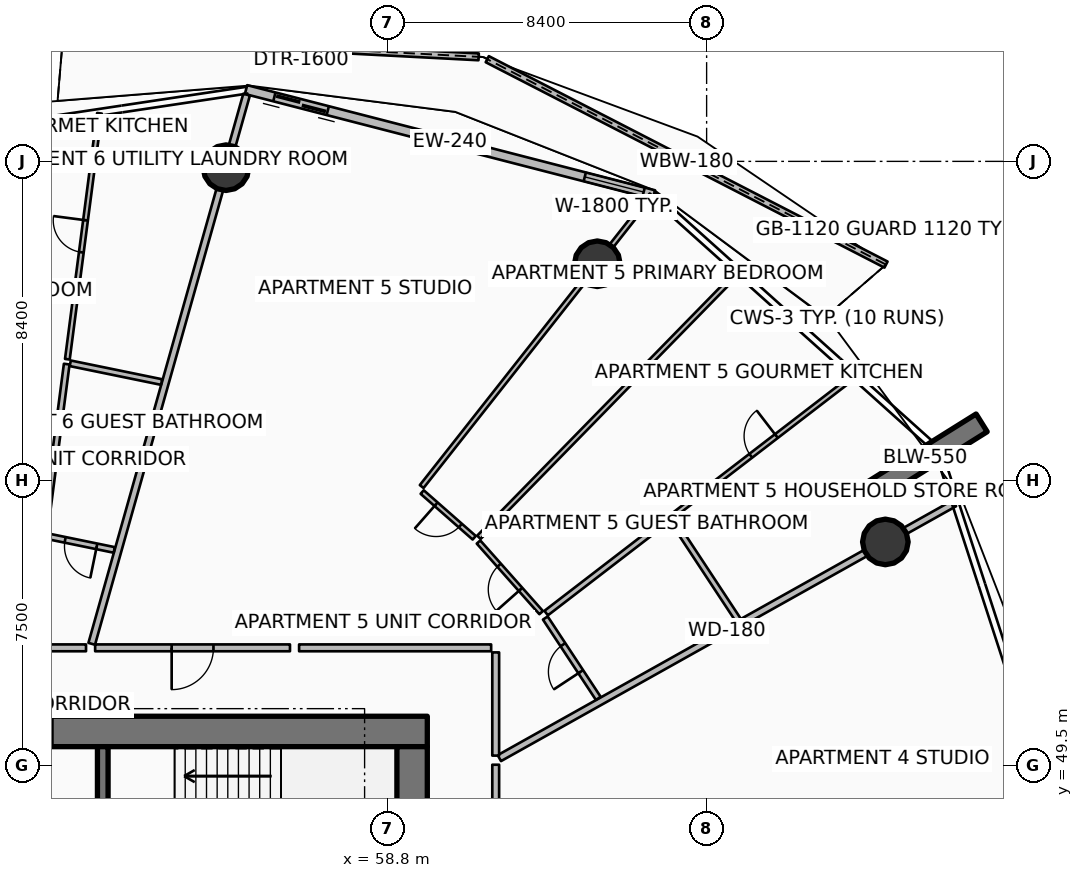
"""IFC4 building model, lengths in metres.
Left out: names, types, materials, properties, quantities, classifications, styles, units other than length and angle.
Written with IfcOpenShell. Run it as: python <this file> out.ifc"""

import sys

from ifc_helpers import new_model, si_unit, direction, frame, frame_2d, origin, origin_2d, place, context, subcontext, project, spatial, polyline, rectangle, circle, outline, extrude, element, fill, save


model = new_model("IFC4")
c1 = context("Model", 3, precision=1e-05, world=origin(), true_north=direction((0.0, 1.0)))
c2 = subcontext(c1, "Body", "Model", "MODEL_VIEW")
j1 = project(units=[si_unit("LENGTHUNIT", "METRE"), si_unit("PLANEANGLEUNIT", "RADIAN")], contexts=[c1])
p1 = place(None, origin())
s1 = spatial("IfcSite", under=j1, at=p1, CompositionType="ELEMENT")
p2 = place(p1, origin())
s2 = spatial("IfcBuilding", under=s1, at=p2, CompositionType="ELEMENT")
p3 = place(p2, frame((0.0, 0.0, 82.65)))
s3 = spatial("IfcBuildingStorey", under=s2, at=p3, CompositionType="ELEMENT", Elevation=82.65)
p4 = place(p3, frame((49.95, 50.4, 0.0), z_axis=(0.0, 0.0, 1.0), x_axis=(1.0, 0.0, 0.0)))
e1 = element("IfcWall", 1, at=p4, inside=s3, PredefinedType="SHEAR", context=c2, shape_type="SweptSolid", body=[
    extrude(rectangle(XDim=9.9, YDim=0.8, at=frame_2d((4.95, 0.0))), origin(), (0.0, 0.0, 1.0), 3.75),
])
p5 = place(p3, frame((59.45, 34.0, 0.0), z_axis=(0.0, 0.0, 1.0), x_axis=(0.0, 1.0, 0.0)))
e2 = element("IfcWall", 2, at=p5, inside=s3, PredefinedType="SHEAR", context=c2, shape_type="SweptSolid", body=[
    extrude(rectangle(XDim=16.0, YDim=0.8, at=frame_2d((8.0, 0.0))), origin(), (0.0, 0.0, 1.0), 3.75),
])
p6 = place(p3, frame((51.31, 46.5, 0.0), z_axis=(0.0, 0.0, 1.0), x_axis=(0.0, 1.0, 0.0)))
e3 = element("IfcWall", 3, at=p6, inside=s3, PredefinedType="SHEAR", context=c2, shape_type="SweptSolid", body=[
    extrude(rectangle(XDim=3.5, YDim=0.28, at=frame_2d((1.75, 0.0))), origin(), (0.0, 0.0, 1.0), 3.75),
])
p7 = place(p3, frame((71.469, 56.665, 0.0), z_axis=(0.0, 0.0, 1.0), x_axis=(0.848053161125, 0.529911158502, 0.0)))
e4 = element("IfcWall", 4, at=p7, inside=s3, PredefinedType="SOLIDWALL", context=c2, shape_type="SweptSolid", body=[
    extrude(rectangle(XDim=3.5, YDim=0.55, at=frame_2d((1.75, 0.0))), origin(), (0.0, 0.0, 1.0), 3.75),
])
for number, where, z_axis, x_axis in (
    (5, (71.903, 55.386, 0.0), (0.0, 0.0, 1.0), (1.0, 0.0, 0.0)),
    (6, (64.323, 62.706, 0.0), (0.0, 0.0, 1.0), (1.0, 0.0, 0.0)),
    (7, (54.553, 65.234, 0.0), (0.0, 0.0, 1.0), (1.0, 0.0, 0.0)),
):
    element("IfcColumn", number, at=place(p3, frame(where, z_axis=z_axis, x_axis=x_axis)), inside=s3, PredefinedType="COLUMN", context=c2, shape_type="SweptSolid", body=[
        extrude(circle(Radius=0.6, at=origin_2d()), origin(), (0.0, 0.0, 1.0), 3.5),
    ])
p8 = place(p3, frame((71.92, 62.684, 0.0), z_axis=(0.0, 0.0, 1.0), x_axis=(-0.888984508261, 0.457937270892, 0.0)))
e8 = element("IfcWall", 8, at=p8, inside=s3, PredefinedType="PARAPET", context=c2, shape_type="SweptSolid", body=[
    extrude(outline(polyline([(0.0, 0.0), (11.803, 0.0), (11.803, 1.148), (5.902, 1.284), (0.0, 1.483), (0.0, 0.0)])), frame((0.0, 0.09, 0.0), z_axis=(0.0, -1.0, 0.0), x_axis=(1.0, 0.0, 0.0)), (0.0, 0.0, 1.0), 0.18),
])
p9 = place(p3, frame((61.201, 68.15, 0.0), z_axis=(0.0, 0.0, 1.0), x_axis=(-0.998637836961, 0.052177299569, 0.0)))
e9 = element("IfcWall", 9, at=p9, inside=s3, PredefinedType="PARAPET", context=c2, shape_type="SweptSolid", body=[
    extrude(outline(polyline([(0.0, 0.0), (10.949, 0.0), (10.949, 1.224), (5.474, 1.127), (0.0, 1.148), (0.0, 0.0)])), frame((0.0, 0.09, 0.0), z_axis=(0.0, -1.0, 0.0), x_axis=(1.0, 0.0, 0.0)), (0.0, 0.0, 1.0), 0.18),
])
p10 = place(p3, frame((65.814, 64.523, 0.0), z_axis=(0.0, 0.0, 1.0), x_axis=(-0.968356180858, 0.249572248045, 0.0)))
e10 = element("IfcWall", 10, at=p10, inside=s3, PredefinedType="SOLIDWALL", context=c2, shape_type="SweptSolid", body=[
    extrude(rectangle(XDim=11.084, YDim=0.24, at=frame_2d((5.542, 0.0))), origin(), (0.0, 0.0, 1.0), 2.45),
])
p11 = place(p10, frame((8.865, 0.0, 0.0)))
e11 = element("IfcOpeningElement", 11, at=p11, cuts=e10, PredefinedType="OPENING", context=c2, shape_type="SweptSolid", body=[
    extrude(rectangle(XDim=1.45, YDim=2.15, at=frame_2d((0.725, 1.075))), frame((0.0, 0.13, 0.0), z_axis=(0.0, -1.0, 0.0), x_axis=(1.0, 0.0, 0.0)), (0.0, 0.0, 1.0), 0.26),
])
p12 = place(p10, frame((0.28, 0.0, 0.65)))
e12 = element("IfcOpeningElement", 12, at=p12, cuts=e10, PredefinedType="OPENING", context=c2, shape_type="SweptSolid", body=[
    extrude(rectangle(XDim=1.6, YDim=1.5, at=frame_2d((0.8, 0.75))), frame((0.0, 0.13, 0.0), z_axis=(0.0, -1.0, 0.0), x_axis=(1.0, 0.0, 0.0)), (0.0, 0.0, 1.0), 0.26),
])
p13 = place(p3, frame((61.746, 49.698, 0.0), z_axis=(0.0, 0.0, 1.0), x_axis=(0.872489938668, 0.488632077256, 0.0)))
e13 = element("IfcWall", 13, at=p13, inside=s3, PredefinedType="PARTITIONING", context=c2, shape_type="SweptSolid", body=[
    extrude(rectangle(XDim=13.725, YDim=0.18, at=frame_2d((6.862, 0.0))), origin(), (0.0, 0.0, 1.0), 2.94),
])
p14 = place(p3, frame((51.019, 52.706, 0.0), z_axis=(0.0, 0.0, 1.0), x_axis=(0.271450895995, 0.962452290279, 0.0)))
e14 = element("IfcWall", 14, at=p14, inside=s3, PredefinedType="PARTITIONING", context=c2, shape_type="SweptSolid", body=[
    extrude(rectangle(XDim=15.014, YDim=0.18, at=frame_2d((7.507, 0.0))), origin(), (0.0, 0.0, 1.0), 2.94),
])
p15 = place(p3, frame((61.65, 43.736, 0.0), z_axis=(0.0, 0.0, 1.0), x_axis=(0.0, 1.0, 0.0)))
e15 = element("IfcWall", 15, at=p15, inside=s3, PredefinedType="PARTITIONING", context=c2, shape_type="SweptSolid", body=[
    extrude(rectangle(XDim=5.789, YDim=0.18, at=frame_2d((2.895, 0.0))), origin(), (0.0, 0.0, 1.0), 2.94),
])
p16 = place(p15, frame((2.344, 0.0, 0.0)))
e16 = element("IfcOpeningElement", 16, at=p16, cuts=e15, PredefinedType="OPENING", context=c2, shape_type="SweptSolid", body=[
    extrude(rectangle(XDim=1.1, YDim=2.1, at=frame_2d((0.55, 1.05))), frame((0.0, 0.1, 0.0), z_axis=(0.0, -1.0, 0.0), x_axis=(1.0, 0.0, 0.0)), (0.0, 0.0, 1.0), 0.2),
])
p17 = place(p3, frame((56.236, 52.6, 0.0), z_axis=(0.0, 0.0, 1.0), x_axis=(-1.0, 0.0, 0.0)))
e17 = element("IfcWall", 17, at=p17, inside=s3, PredefinedType="PARTITIONING", context=c2, shape_type="SweptSolid", body=[
    extrude(rectangle(XDim=5.127, YDim=0.18, at=frame_2d((2.563, 0.0))), origin(), (0.0, 0.0, 1.0), 2.94),
])
p18 = place(p17, frame((2.013, 0.0, 0.0)))
e18 = element("IfcOpeningElement", 18, at=p18, cuts=e17, PredefinedType="OPENING", context=c2, shape_type="SweptSolid", body=[
    extrude(rectangle(XDim=1.1, YDim=2.1, at=frame_2d((0.55, 1.05))), frame((0.0, 0.1, 0.0), z_axis=(0.0, -1.0, 0.0), x_axis=(1.0, 0.0, 0.0)), (0.0, 0.0, 1.0), 0.2),
])
p19 = place(p3, frame((61.65, 49.764, 0.0), z_axis=(0.0, 0.0, 1.0), x_axis=(0.0, 1.0, 0.0)))
e19 = element("IfcWall", 19, at=p19, inside=s3, PredefinedType="PARTITIONING", context=c2, shape_type="SweptSolid", body=[
    extrude(rectangle(XDim=2.716, YDim=0.18, at=frame_2d((1.358, 0.0))), origin(), (0.0, 0.0, 1.0), 2.94),
])
p20 = place(p3, frame((61.53, 52.6, 0.0), z_axis=(0.0, 0.0, 1.0), x_axis=(-1.0, 0.0, 0.0)))
e20 = element("IfcWall", 20, at=p20, inside=s3, PredefinedType="PARTITIONING", context=c2, shape_type="SweptSolid", body=[
    extrude(rectangle(XDim=5.054, YDim=0.18, at=frame_2d((2.527, 0.0))), origin(), (0.0, 0.0, 1.0), 2.94),
])
p21 = place(p3, frame((59.702, 56.844, 0.0), z_axis=(0.0, 0.0, 1.0), x_axis=(0.619083405129, 0.785325243128, 0.0)))
e21 = element("IfcWall", 21, at=p21, inside=s3, PredefinedType="PARTITIONING", context=c2, shape_type="SweptSolid", body=[
    extrude(rectangle(XDim=9.769, YDim=0.125, at=frame_2d((4.885, 0.0))), origin(), (0.0, 0.0, 1.0), 2.94),
])
p22 = place(p3, frame((64.35, 51.271, 0.0), z_axis=(0.0, 0.0, 1.0), x_axis=(-0.550510405652, 0.83482830167, 0.0)))
e22 = element("IfcWall", 22, at=p22, inside=s3, PredefinedType="PARTITIONING", context=c2, shape_type="SweptSolid", body=[
    extrude(rectangle(XDim=2.532, YDim=0.15, at=frame_2d((1.266, 0.0))), origin(), (0.0, 0.0, 1.0), 2.94),
])
p23 = place(p22, frame((0.841, 0.0, 0.0)))
e23 = element("IfcOpeningElement", 23, at=p23, cuts=e22, PredefinedType="OPENING", context=c2, shape_type="SweptSolid", body=[
    extrude(rectangle(XDim=0.85, YDim=2.06, at=frame_2d((0.425, 1.03))), frame((0.0, 0.085, 0.0), z_axis=(0.0, -1.0, 0.0), x_axis=(1.0, 0.0, 0.0)), (0.0, 0.0, 1.0), 0.17),
])
p24 = place(p3, frame((68.031, 53.333, 0.0), z_axis=(0.0, 0.0, 1.0), x_axis=(-0.550480727927, 0.83484787128, 0.0)))
e24 = element("IfcWall", 24, at=p24, inside=s3, PredefinedType="PARTITIONING", context=c2, shape_type="SweptSolid", body=[
    extrude(rectangle(XDim=3.143, YDim=0.15, at=frame_2d((1.572, 0.0))), origin(), (0.0, 0.0, 1.0), 2.94),
])
p25 = place(p3, frame((62.978, 53.514, 0.0), z_axis=(0.0, 0.0, 1.0), x_axis=(0.792801485355, 0.609479946199, 0.0)))
e25 = element("IfcWall", 25, at=p25, inside=s3, PredefinedType="PARTITIONING", context=c2, shape_type="SweptSolid", body=[
    extrude(rectangle(XDim=4.09, YDim=0.15, at=frame_2d((2.045, 0.0))), origin(), (0.0, 0.0, 1.0), 2.94),
])
p26 = place(p3, frame((66.323, 56.086, 0.0), z_axis=(0.0, 0.0, 1.0), x_axis=(0.792792040596, 0.60949223159, 0.0)))
e26 = element("IfcWall", 26, at=p26, inside=s3, PredefinedType="PARTITIONING", context=c2, shape_type="SweptSolid", body=[
    extrude(rectangle(XDim=5.994, YDim=0.125, at=frame_2d((2.997, 0.0))), origin(), (0.0, 0.0, 1.0), 2.94),
])
p27 = place(p26, frame((2.572, 0.0, 0.0)))
e27 = element("IfcOpeningElement", 27, at=p27, cuts=e26, PredefinedType="OPENING", context=c2, shape_type="SweptSolid", body=[
    extrude(rectangle(XDim=0.85, YDim=2.06, at=frame_2d((0.425, 1.03))), frame((0.0, 0.073, 0.0), z_axis=(0.0, -1.0, 0.0), x_axis=(1.0, 0.0, 0.0)), (0.0, 0.0, 1.0), 0.145),
])
p28 = place(p3, frame((61.208, 55.508, 0.0), z_axis=(0.0, 0.0, 1.0), x_axis=(0.699096858951, 0.715026979774, 0.0)))
e28 = element("IfcWall", 28, at=p28, inside=s3, PredefinedType="PARTITIONING", context=c2, shape_type="SweptSolid", body=[
    extrude(rectangle(XDim=9.747, YDim=0.125, at=frame_2d((4.874, 0.0))), origin(), (0.0, 0.0, 1.0), 2.94),
])
p29 = place(p3, frame((62.846, 53.527, 0.0), z_axis=(0.0, 0.0, 1.0), x_axis=(-0.663881646848, 0.747837655497, 0.0)))
e29 = element("IfcWall", 29, at=p29, inside=s3, PredefinedType="PARTITIONING", context=c2, shape_type="SweptSolid", body=[
    extrude(rectangle(XDim=2.483, YDim=0.125, at=frame_2d((1.242, 0.0))), origin(), (0.0, 0.0, 1.0), 2.94),
])
p30 = place(p29, frame((0.817, 0.0, 0.0)))
e30 = element("IfcOpeningElement", 30, at=p30, cuts=e29, PredefinedType="OPENING", context=c2, shape_type="SweptSolid", body=[
    extrude(rectangle(XDim=0.85, YDim=2.06, at=frame_2d((0.425, 1.03))), frame((0.0, 0.073, 0.0), z_axis=(0.0, -1.0, 0.0), x_axis=(1.0, 0.0, 0.0)), (0.0, 0.0, 1.0), 0.145),
])
p31 = place(p3, frame((61.084, 55.497, 0.0), z_axis=(0.0, 0.0, 1.0), x_axis=(-0.75124742024, 0.660020691784, 0.0)))
e31 = element("IfcWall", 31, at=p31, inside=s3, PredefinedType="PARTITIONING", context=c2, shape_type="SweptSolid", body=[
    extrude(rectangle(XDim=1.823, YDim=0.125, at=frame_2d((0.911, 0.0))), origin(), (0.0, 0.0, 1.0), 2.94),
])
p32 = place(p31, frame((0.486, 0.0, 0.0)))
e32 = element("IfcOpeningElement", 32, at=p32, cuts=e31, PredefinedType="OPENING", context=c2, shape_type="SweptSolid", body=[
    extrude(rectangle(XDim=0.85, YDim=2.06, at=frame_2d((0.425, 1.03))), frame((0.0, 0.073, 0.0), z_axis=(0.0, -1.0, 0.0), x_axis=(1.0, 0.0, 0.0)), (0.0, 0.0, 1.0), 0.145),
])
p33 = place(p3, frame((50.869, 52.6, 0.0), z_axis=(0.0, 0.0, 1.0), x_axis=(-1.0, 0.0, 0.0)))
e33 = element("IfcWall", 33, at=p33, inside=s3, PredefinedType="PARTITIONING", context=c2, shape_type="SweptSolid", body=[
    extrude(rectangle(XDim=4.004, YDim=0.18, at=frame_2d((2.002, 0.0))), origin(), (0.0, 0.0, 1.0), 2.94),
])
p34 = place(p3, frame((51.612, 55.176, 0.0), z_axis=(0.0, 0.0, 1.0), x_axis=(-0.979559973395, 0.201152326663, 0.0)))
e34 = element("IfcWall", 34, at=p34, inside=s3, PredefinedType="PARTITIONING", context=c2, shape_type="SweptSolid", body=[
    extrude(rectangle(XDim=1.789, YDim=0.15, at=frame_2d((0.895, 0.0))), origin(), (0.0, 0.0, 1.0), 2.94),
])
p35 = place(p34, frame((0.469, 0.0, 0.0)))
e35 = element("IfcOpeningElement", 35, at=p35, cuts=e34, PredefinedType="OPENING", context=c2, shape_type="SweptSolid", body=[
    extrude(rectangle(XDim=0.85, YDim=2.06, at=frame_2d((0.425, 1.03))), frame((0.0, 0.085, 0.0), z_axis=(0.0, -1.0, 0.0), x_axis=(1.0, 0.0, 0.0)), (0.0, 0.0, 1.0), 0.17),
])
p36 = place(p3, frame((52.858, 59.594, 0.0), z_axis=(0.0, 0.0, 1.0), x_axis=(-0.979569035828, 0.201108189903, 0.0)))
e36 = element("IfcWall", 36, at=p36, inside=s3, PredefinedType="PARTITIONING", context=c2, shape_type="SweptSolid", body=[
    extrude(rectangle(XDim=2.453, YDim=0.15, at=frame_2d((1.227, 0.0))), origin(), (0.0, 0.0, 1.0), 2.94),
])
p37 = place(p3, frame((49.783, 55.643, 0.0), z_axis=(0.0, 0.0, 1.0), x_axis=(0.129624682181, 0.991563130501, 0.0)))
e37 = element("IfcWall", 37, at=p37, inside=s3, PredefinedType="PARTITIONING", context=c2, shape_type="SweptSolid", body=[
    extrude(rectangle(XDim=4.46, YDim=0.15, at=frame_2d((2.23, 0.0))), origin(), (0.0, 0.0, 1.0), 2.94),
])
p38 = place(p3, frame((50.378, 60.194, 0.0), z_axis=(0.0, 0.0, 1.0), x_axis=(0.129622249643, 0.991563448498, 0.0)))
e38 = element("IfcWall", 38, at=p38, inside=s3, PredefinedType="PARTITIONING", context=c2, shape_type="SweptSolid", body=[
    extrude(rectangle(XDim=6.526, YDim=0.125, at=frame_2d((3.263, 0.0))), origin(), (0.0, 0.0, 1.0), 2.94),
])
p39 = place(p38, frame((2.838, 0.0, 0.0)))
e39 = element("IfcOpeningElement", 39, at=p39, cuts=e38, PredefinedType="OPENING", context=c2, shape_type="SweptSolid", body=[
    extrude(rectangle(XDim=0.85, YDim=2.06, at=frame_2d((0.425, 1.03))), frame((0.0, 0.073, 0.0), z_axis=(0.0, -1.0, 0.0), x_axis=(1.0, 0.0, 0.0)), (0.0, 0.0, 1.0), 0.145),
])
p40 = place(p11, origin())
e40 = element("IfcDoor", 40, at=p40, inside=s3, OperationType="DOUBLE_DOOR_SLIDING", PredefinedType="DOOR", context=c2, shape_type="SweptSolid", body=[
    extrude(rectangle(XDim=1.45, YDim=2.15, at=frame_2d((0.725, 1.075))), frame((0.0, 0.025, 0.0), z_axis=(0.0, -1.0, 0.0), x_axis=(1.0, 0.0, 0.0)), (0.0, 0.0, 1.0), 0.05),
])
fill(e11, e40)
p41 = place(p12, origin())
e41 = element("IfcWindow", 41, at=p41, inside=s3, PartitioningType="SINGLE_PANEL", PredefinedType="WINDOW", context=c2, shape_type="SweptSolid", body=[
    extrude(rectangle(XDim=1.6, YDim=1.5, at=frame_2d((0.8, 0.75))), frame((0.0, 0.03, 0.0), z_axis=(0.0, -1.0, 0.0), x_axis=(1.0, 0.0, 0.0)), (0.0, 0.0, 1.0), 0.06),
])
fill(e12, e41)
p42 = place(p18, origin())
e42 = element("IfcDoor", 42, at=p42, inside=s3, OperationType="SINGLE_SWING_RIGHT", PredefinedType="DOOR", context=c2, shape_type="SweptSolid", body=[
    extrude(rectangle(XDim=1.1, YDim=2.1, at=frame_2d((0.55, 1.05))), frame((0.0, 0.025, 0.0), z_axis=(0.0, -1.0, 0.0), x_axis=(1.0, 0.0, 0.0)), (0.0, 0.0, 1.0), 0.05),
])
fill(e18, e42)
p43 = place(p23, origin())
e43 = element("IfcDoor", 43, at=p43, inside=s3, OperationType="SINGLE_SWING_LEFT", PredefinedType="DOOR", context=c2, shape_type="SweptSolid", body=[
    extrude(rectangle(XDim=0.85, YDim=2.06, at=frame_2d((0.425, 1.03))), frame((0.0, 0.025, 0.0), z_axis=(0.0, -1.0, 0.0), x_axis=(1.0, 0.0, 0.0)), (0.0, 0.0, 1.0), 0.05),
])
fill(e23, e43)
p44 = place(p27, origin())
e44 = element("IfcDoor", 44, at=p44, inside=s3, OperationType="SINGLE_SWING_RIGHT", PredefinedType="DOOR", context=c2, shape_type="SweptSolid", body=[
    extrude(rectangle(XDim=0.85, YDim=2.06, at=frame_2d((0.425, 1.03))), frame((0.0, 0.025, 0.0), z_axis=(0.0, -1.0, 0.0), x_axis=(1.0, 0.0, 0.0)), (0.0, 0.0, 1.0), 0.05),
])
fill(e27, e44)
p45 = place(p30, origin())
e45 = element("IfcDoor", 45, at=p45, inside=s3, OperationType="SINGLE_SWING_LEFT", PredefinedType="DOOR", context=c2, shape_type="SweptSolid", body=[
    extrude(rectangle(XDim=0.85, YDim=2.06, at=frame_2d((0.425, 1.03))), frame((0.0, 0.025, 0.0), z_axis=(0.0, -1.0, 0.0), x_axis=(1.0, 0.0, 0.0)), (0.0, 0.0, 1.0), 0.05),
])
fill(e30, e45)
p46 = place(p32, origin())
e46 = element("IfcDoor", 46, at=p46, inside=s3, OperationType="SINGLE_SWING_RIGHT", PredefinedType="DOOR", context=c2, shape_type="SweptSolid", body=[
    extrude(rectangle(XDim=0.85, YDim=2.06, at=frame_2d((0.425, 1.03))), frame((0.0, 0.025, 0.0), z_axis=(0.0, -1.0, 0.0), x_axis=(1.0, 0.0, 0.0)), (0.0, 0.0, 1.0), 0.05),
])
fill(e32, e46)
p47 = place(p35, origin())
e47 = element("IfcDoor", 47, at=p47, inside=s3, OperationType="SINGLE_SWING_LEFT", PredefinedType="DOOR", context=c2, shape_type="SweptSolid", body=[
    extrude(rectangle(XDim=0.85, YDim=2.06, at=frame_2d((0.425, 1.03))), frame((0.0, 0.025, 0.0), z_axis=(0.0, -1.0, 0.0), x_axis=(1.0, 0.0, 0.0)), (0.0, 0.0, 1.0), 0.05),
])
fill(e35, e47)
p48 = place(p39, origin())
e48 = element("IfcDoor", 48, at=p48, inside=s3, OperationType="SINGLE_SWING_RIGHT", PredefinedType="DOOR", context=c2, shape_type="SweptSolid", body=[
    extrude(rectangle(XDim=0.85, YDim=2.06, at=frame_2d((0.425, 1.03))), frame((0.0, 0.025, 0.0), z_axis=(0.0, -1.0, 0.0), x_axis=(1.0, 0.0, 0.0)), (0.0, 0.0, 1.0), 0.05),
])
fill(e39, e48)
save(model, sys.argv[1])
